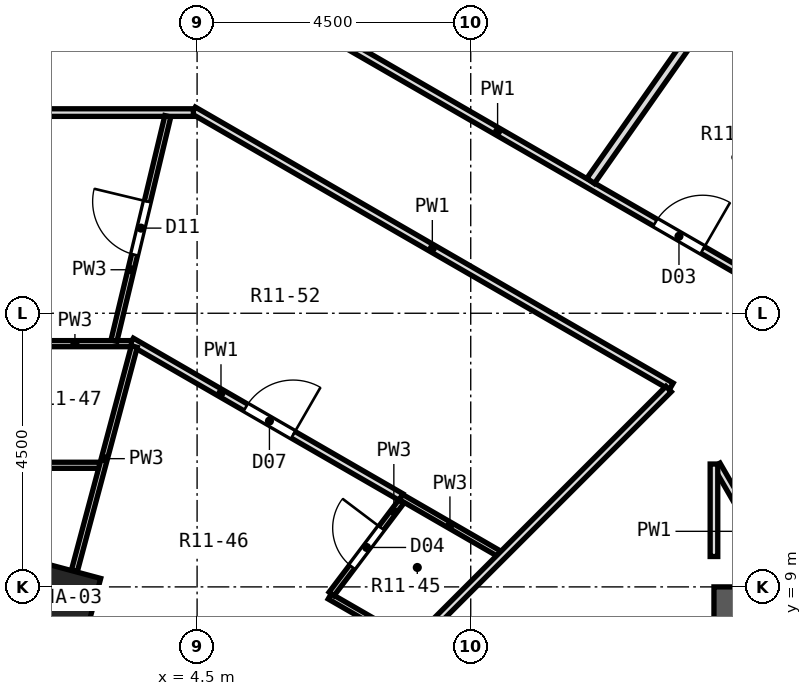
"""IFC4 building model, lengths in metres.
Left out: names, types, materials, properties, quantities, classifications, styles, units other than length and angle.
Written with IfcOpenShell. Run it as: python <this file> out.ifc"""

import sys

from ifc_helpers import new_model, si_unit, direction, frame, frame_2d, origin, origin_2d, place, context, subcontext, project, spatial, rectangle, extrude, element, fill, save


model = new_model("IFC4")
c1 = context("Model", 3, precision=1e-05, world=origin(), true_north=direction((0.0, 1.0)))
c2 = subcontext(c1, "Body", "Model", "MODEL_VIEW")
j1 = project(units=[si_unit("LENGTHUNIT", "METRE"), si_unit("PLANEANGLEUNIT", "RADIAN")], contexts=[c1])
p1 = place(None, origin())
s1 = spatial("IfcSite", under=j1, at=p1, CompositionType="ELEMENT")
p2 = place(p1, origin())
s2 = spatial("IfcBuilding", under=s1, at=p2, CompositionType="ELEMENT")
p3 = place(p2, frame((0.0, 0.0, 46.1)))
s3 = spatial("IfcBuildingStorey", under=s2, at=p3, CompositionType="ELEMENT", Elevation=46.1)
p4 = place(p3, frame((2.364, 8.821, 0.0), z_axis=(0.0, 0.0, 1.0), x_axis=(0.258819045103, 0.965925826289, 0.0)))
e1 = element("IfcColumn", 1, at=p4, inside=s3, PredefinedType="COLUMN", context=c2, shape_type="SweptSolid", body=[
    extrude(rectangle(XDim=0.9, YDim=0.9, at=origin_2d()), origin(), (0.0, 0.0, 1.0), 3.3),
])
p5 = place(p3, frame((13.5, -9.0, 0.0), z_axis=(0.0, 0.0, 1.0), x_axis=(0.0, 1.0, 0.0)))
e2 = element("IfcWall", 2, at=p5, inside=s3, PredefinedType="SHEAR", context=c2, shape_type="SweptSolid", body=[
    extrude(rectangle(XDim=18.0, YDim=1.0, at=frame_2d((9.0, 0.0))), origin(), (0.0, 0.0, 1.0), 3.3),
])
p6 = place(p5, frame((15.4, 0.0, 0.0)))
e3 = element("IfcOpeningElement", 3, at=p6, cuts=e2, PredefinedType="OPENING", context=c2, shape_type="SweptSolid", body=[
    extrude(rectangle(XDim=1.2, YDim=2.1, at=frame_2d((0.6, 1.05))), frame((0.0, 0.512, 0.0), z_axis=(0.0, -1.0, 0.0), x_axis=(1.0, 0.0, 0.0)), (0.0, 0.0, 1.0), 1.024),
])
p7 = place(p5, frame((1.4, 0.0, 0.0)))
e4 = element("IfcOpeningElement", 4, at=p7, cuts=e2, PredefinedType="OPENING", context=c2, shape_type="SweptSolid", body=[
    extrude(rectangle(XDim=1.2, YDim=2.1, at=frame_2d((0.6, 1.05))), frame((0.0, 0.512, 0.0), z_axis=(0.0, -1.0, 0.0), x_axis=(1.0, 0.0, 0.0)), (0.0, 0.0, 1.0), 1.024),
])
p8 = place(p5, frame((7.5, 0.0, 0.0)))
e5 = element("IfcOpeningElement", 5, at=p8, cuts=e2, PredefinedType="OPENING", context=c2, shape_type="SweptSolid", body=[
    extrude(rectangle(XDim=3.0, YDim=2.4, at=frame_2d((1.5, 1.2))), frame((0.0, 0.512, 0.0), z_axis=(0.0, -1.0, 0.0), x_axis=(1.0, 0.0, 0.0)), (0.0, 0.0, 1.0), 1.024),
])
p9 = place(p3, frame((13.045, 11.005, 0.0), z_axis=(0.0, 0.0, 1.0), x_axis=(0.500066958712, -0.865986741702, 0.0)))
e6 = element("IfcWall", 6, at=p9, inside=s3, PredefinedType="PARTITIONING", context=c2, shape_type="SweptSolid", body=[
    extrude(rectangle(XDim=1.738, YDim=0.125, at=frame_2d((0.869, 0.0))), origin(), (0.0, 0.0, 1.0), 2.75),
])
p10 = place(p3, frame((13.006, 18.445, 0.0), z_axis=(0.0, 0.0, 1.0), x_axis=(0.765937067023, -0.642915553832, 0.0)))
e7 = element("IfcWall", 7, at=p10, inside=s3, PredefinedType="PARTITIONING", context=c2, shape_type="SweptSolid", body=[
    extrude(rectangle(XDim=3.81, YDim=0.1, at=frame_2d((1.905, 0.0))), origin(), (0.0, 0.0, 1.0), 2.75),
])
p11 = place(p3, frame((6.681, 8.844, 0.0), z_axis=(0.0, 0.0, 1.0), x_axis=(0.866340515316, -0.499453813202, 0.0)))
e8 = element("IfcWall", 8, at=p11, inside=s3, PredefinedType="PARTITIONING", context=c2, shape_type="SweptSolid", body=[
    extrude(rectangle(XDim=1.521, YDim=0.1, at=frame_2d((0.761, 0.0))), origin(), (0.0, 0.0, 1.0), 2.75),
])
p12 = place(p3, frame((7.853, 10.478, 0.0), z_axis=(0.0, 0.0, 1.0), x_axis=(0.866004081989, -0.500036928615, 0.0)))
e9 = element("IfcWall", 9, at=p12, inside=s3, PredefinedType="PARTITIONING", context=c2, shape_type="SweptSolid", body=[
    extrude(rectangle(XDim=1.859, YDim=0.1, at=frame_2d((0.93, 0.0))), origin(), (0.0, 0.0, 1.0), 2.75),
])
p13 = place(p3, frame((3.42, 13.036, 0.0), z_axis=(0.0, 0.0, 1.0), x_axis=(0.86610376991, -0.499864241317, 0.0)))
e10 = element("IfcWall", 10, at=p13, inside=s3, PredefinedType="PARTITIONING", context=c2, shape_type="SweptSolid", body=[
    extrude(rectangle(XDim=5.118, YDim=0.125, at=frame_2d((2.559, 0.0))), origin(), (0.0, 0.0, 1.0), 2.75),
])
p14 = place(p13, frame((2.17, 0.0, 0.0)))
e11 = element("IfcOpeningElement", 11, at=p14, cuts=e10, PredefinedType="OPENING", context=c2, shape_type="SweptSolid", body=[
    extrude(rectangle(XDim=0.9, YDim=2.1, at=frame_2d((0.45, 1.05))), frame((0.0, 0.074, 0.0), z_axis=(0.0, -1.0, 0.0), x_axis=(1.0, 0.0, 0.0)), (0.0, 0.0, 1.0), 0.149),
])
p15 = place(p3, frame((4.439, 16.836, 0.0), z_axis=(0.0, 0.0, 1.0), x_axis=(0.865982621983, -0.500074092933, 0.0)))
e12 = element("IfcWall", 12, at=p15, inside=s3, PredefinedType="PARTITIONING", context=c2, shape_type="SweptSolid", body=[
    extrude(rectangle(XDim=9.075, YDim=0.125, at=frame_2d((4.537, 0.0))), origin(), (0.0, 0.0, 1.0), 2.75),
])
p16 = place(p3, frame((5.029, 19.036, 0.0), z_axis=(0.0, 0.0, 1.0), x_axis=(0.866024825845, -0.50000100102, 0.0)))
e13 = element("IfcWall", 13, at=p16, inside=s3, PredefinedType="PARTITIONING", context=c2, shape_type="SweptSolid", body=[
    extrude(rectangle(XDim=10.192, YDim=0.125, at=frame_2d((5.096, 0.0))), origin(), (0.0, 0.0, 1.0), 2.75),
])
p17 = place(p16, frame((8.09, 0.0, 0.0)))
e14 = element("IfcOpeningElement", 14, at=p17, cuts=e13, PredefinedType="OPENING", context=c2, shape_type="SweptSolid", body=[
    extrude(rectangle(XDim=0.9, YDim=2.1, at=frame_2d((0.45, 1.05))), frame((0.0, 0.074, 0.0), z_axis=(0.0, -1.0, 0.0), x_axis=(1.0, 0.0, 0.0)), (0.0, 0.0, 1.0), 0.149),
])
p18 = place(p3, frame((1.364, 11.0, 0.0), z_axis=(0.0, 0.0, 1.0), x_axis=(1.0, 0.0, 0.0)))
e15 = element("IfcWall", 15, at=p18, inside=s3, PredefinedType="PARTITIONING", context=c2, shape_type="SweptSolid", body=[
    extrude(rectangle(XDim=1.533, YDim=0.1, at=frame_2d((0.767, 0.0))), origin(), (0.0, 0.0, 1.0), 2.75),
])
p19 = place(p3, frame((1.562, 13.0, 0.0), z_axis=(0.0, 0.0, 1.0), x_axis=(1.0, 0.0, 0.0)))
e16 = element("IfcWall", 16, at=p19, inside=s3, PredefinedType="PARTITIONING", context=c2, shape_type="SweptSolid", body=[
    extrude(rectangle(XDim=1.858, YDim=0.1, at=frame_2d((0.929, 0.0))), origin(), (0.0, 0.0, 1.0), 2.75),
])
p20 = place(p3, frame((-4.574, 16.8, 0.0), z_axis=(0.0, 0.0, 1.0), x_axis=(1.0, 0.0, 0.0)))
e17 = element("IfcWall", 17, at=p20, inside=s3, PredefinedType="PARTITIONING", context=c2, shape_type="SweptSolid", body=[
    extrude(rectangle(XDim=9.014, YDim=0.125, at=frame_2d((4.507, 0.0))), origin(), (0.0, 0.0, 1.0), 2.75),
])
p21 = place(p3, frame((6.783, 6.783, 0.0), z_axis=(0.0, 0.0, 1.0), x_axis=(0.707106781187, 0.707106781187, 0.0)))
e18 = element("IfcWall", 18, at=p21, inside=s3, PredefinedType="PARTITIONING", context=c2, shape_type="SweptSolid", body=[
    extrude(rectangle(XDim=7.738, YDim=0.125, at=frame_2d((3.869, 0.0))), origin(), (0.0, 0.0, 1.0), 2.75),
])
p22 = place(p3, frame((6.711, 8.884, 0.0), z_axis=(0.0, 0.0, 1.0), x_axis=(0.602602666336, 0.798041368931, 0.0)))
e19 = element("IfcWall", 19, at=p22, inside=s3, PredefinedType="PARTITIONING", context=c2, shape_type="SweptSolid", body=[
    extrude(rectangle(XDim=1.904, YDim=0.1, at=frame_2d((0.952, 0.0))), origin(), (0.0, 0.0, 1.0), 2.75),
])
p23 = place(p22, frame((0.558, 0.0, 0.0)))
e20 = element("IfcOpeningElement", 20, at=p23, cuts=e19, PredefinedType="OPENING", context=c2, shape_type="SweptSolid", body=[
    extrude(rectangle(XDim=0.8, YDim=2.1, at=frame_2d((0.4, 1.05))), frame((0.0, 0.062, 0.0), z_axis=(0.0, -1.0, 0.0), x_axis=(1.0, 0.0, 0.0)), (0.0, 0.0, 1.0), 0.124),
])
p24 = place(p3, frame((10.972, 15.677, 0.0), z_axis=(0.0, 0.0, 1.0), x_axis=(0.574550995915, 0.818468785656, 0.0)))
e21 = element("IfcWall", 21, at=p24, inside=s3, PredefinedType="PARTITIONING", context=c2, shape_type="SweptSolid", body=[
    extrude(rectangle(XDim=8.455, YDim=0.15, at=frame_2d((4.228, 0.0))), origin(), (0.0, 0.0, 1.0), 2.75),
])
p25 = place(p3, frame((2.482, 9.265, 0.0), z_axis=(0.0, 0.0, 1.0), x_axis=(0.258188185818, 0.966094643761, 0.0)))
e22 = element("IfcWall", 22, at=p25, inside=s3, PredefinedType="PARTITIONING", context=c2, shape_type="SweptSolid", body=[
    extrude(rectangle(XDim=3.816, YDim=0.1, at=frame_2d((1.908, 0.0))), origin(), (0.0, 0.0, 1.0), 2.75),
])
p26 = place(p3, frame((3.133, 13.049, 0.0), z_axis=(0.0, 0.0, 1.0), x_axis=(0.233368086801, 0.972388469729, 0.0)))
e23 = element("IfcWall", 23, at=p26, inside=s3, PredefinedType="PARTITIONING", context=c2, shape_type="SweptSolid", body=[
    extrude(rectangle(XDim=3.795, YDim=0.1, at=frame_2d((1.898, 0.0))), origin(), (0.0, 0.0, 1.0), 2.75),
])
p27 = place(p26, frame((1.454, 0.0, 0.0)))
e24 = element("IfcOpeningElement", 24, at=p27, cuts=e23, PredefinedType="OPENING", context=c2, shape_type="SweptSolid", body=[
    extrude(rectangle(XDim=0.9, YDim=2.1, at=frame_2d((0.45, 1.05))), frame((0.0, 0.062, 0.0), z_axis=(0.0, -1.0, 0.0), x_axis=(1.0, 0.0, 0.0)), (0.0, 0.0, 1.0), 0.124),
])
p28 = place(p3, frame((13.0, 9.5, 0.0), z_axis=(0.0, 0.0, 1.0), x_axis=(0.0, 1.0, 0.0)))
e25 = element("IfcWall", 25, at=p28, inside=s3, PredefinedType="PARTITIONING", context=c2, shape_type="SweptSolid", body=[
    extrude(rectangle(XDim=1.521, YDim=0.125, at=frame_2d((0.76, 0.0))), origin(), (0.0, 0.0, 1.0), 2.75),
])
p29 = place(p17, origin())
e26 = element("IfcDoor", 26, at=p29, inside=s3, OperationType="SINGLE_SWING_RIGHT", PredefinedType="DOOR", context=c2, shape_type="SweptSolid", body=[
    extrude(rectangle(XDim=0.9, YDim=2.1, at=frame_2d((0.45, 1.05))), frame((0.0, 0.025, 0.0), z_axis=(0.0, -1.0, 0.0), x_axis=(1.0, 0.0, 0.0)), (0.0, 0.0, 1.0), 0.05),
])
fill(e14, e26)
p30 = place(p23, origin())
e27 = element("IfcDoor", 27, at=p30, inside=s3, OperationType="SINGLE_SWING_RIGHT", PredefinedType="DOOR", context=c2, shape_type="SweptSolid", body=[
    extrude(rectangle(XDim=0.8, YDim=2.1, at=frame_2d((0.4, 1.05))), frame((0.0, 0.025, 0.0), z_axis=(0.0, -1.0, 0.0), x_axis=(1.0, 0.0, 0.0)), (0.0, 0.0, 1.0), 0.05),
])
fill(e20, e27)
p31 = place(p14, origin())
e28 = element("IfcDoor", 28, at=p31, inside=s3, OperationType="SINGLE_SWING_RIGHT", PredefinedType="DOOR", context=c2, shape_type="SweptSolid", body=[
    extrude(rectangle(XDim=0.9, YDim=2.1, at=frame_2d((0.45, 1.05))), frame((0.0, 0.025, 0.0), z_axis=(0.0, -1.0, 0.0), x_axis=(1.0, 0.0, 0.0)), (0.0, 0.0, 1.0), 0.05),
])
fill(e11, e28)
p32 = place(p27, origin())
e29 = element("IfcDoor", 29, at=p32, inside=s3, OperationType="SINGLE_SWING_RIGHT", PredefinedType="DOOR", context=c2, shape_type="SweptSolid", body=[
    extrude(rectangle(XDim=0.9, YDim=2.1, at=frame_2d((0.45, 1.05))), frame((0.0, 0.025, 0.0), z_axis=(0.0, -1.0, 0.0), x_axis=(1.0, 0.0, 0.0)), (0.0, 0.0, 1.0), 0.05),
])
fill(e24, e29)
save(model, sys.argv[1])
